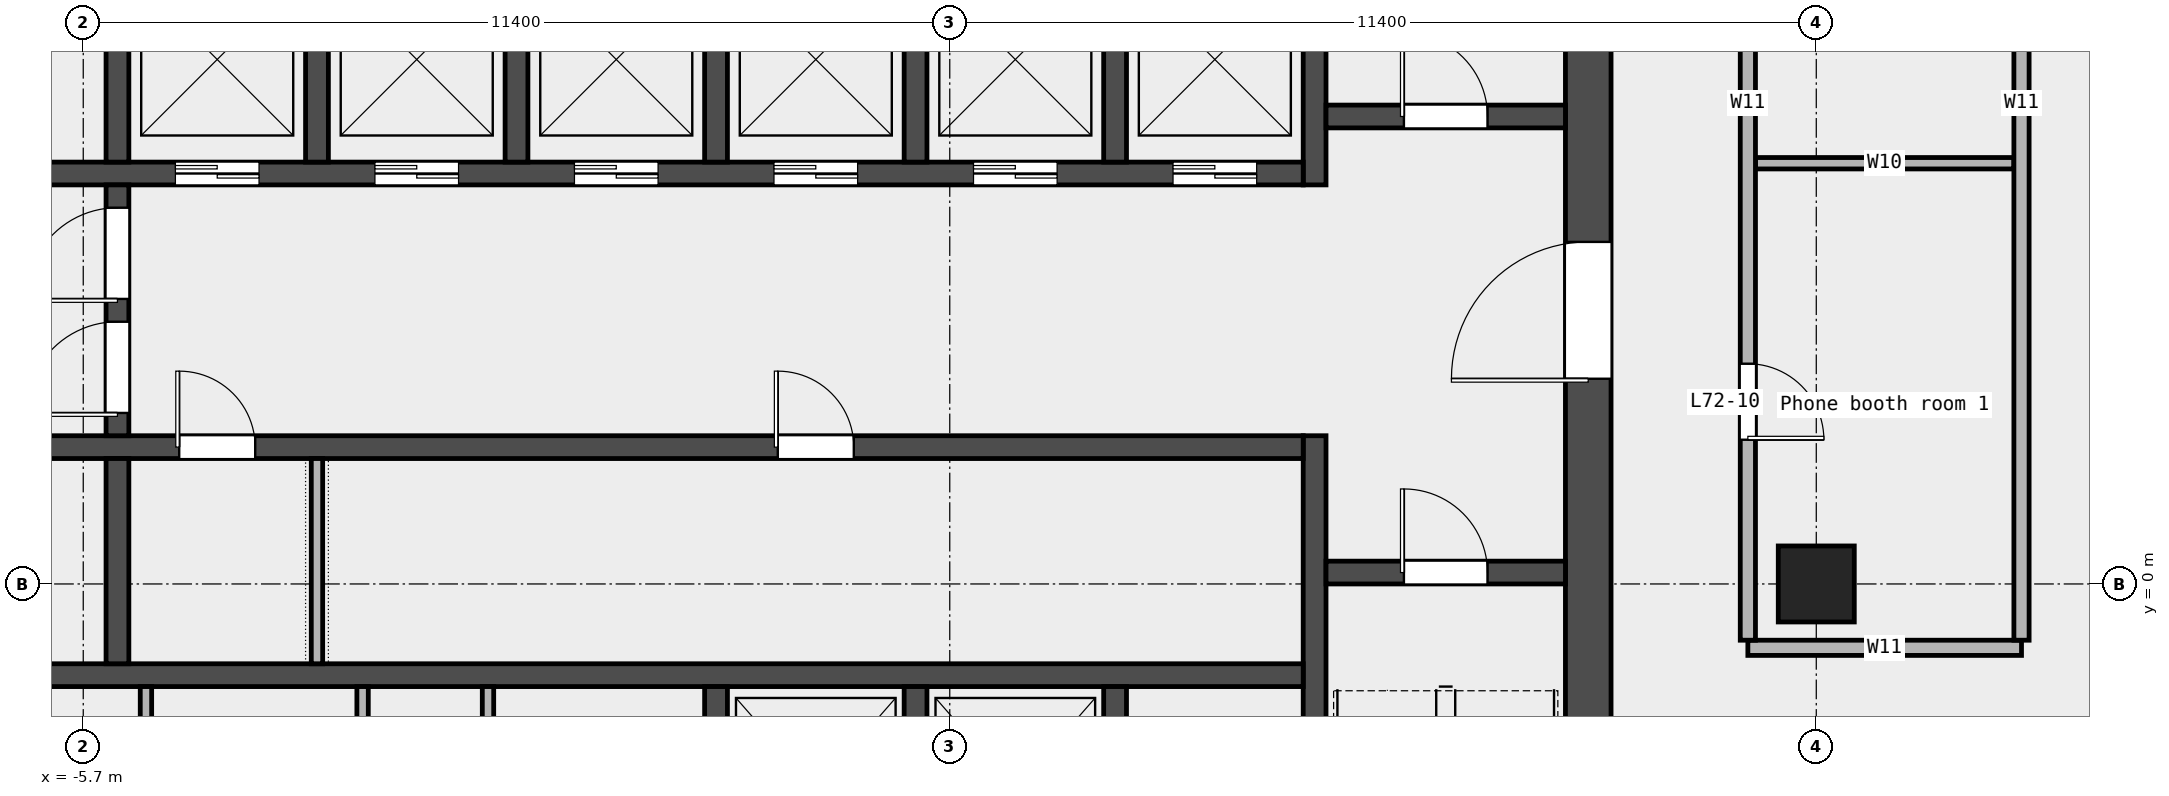
"""IFC4 building model, lengths in metres.
Left out: names, types, materials, properties, quantities, classifications, styles, units other than length and angle.
Written with IfcOpenShell. Run it as: python <this file> out.ifc"""

import sys

from ifc_helpers import new_model, si_unit, direction, frame, frame_2d, origin, origin_2d, place, context, subcontext, project, spatial, rectangle, extrude, element, fill, save


model = new_model("IFC4")
c1 = context("Model", 3, precision=1e-05, world=origin(), true_north=direction((0.0, 1.0)))
c2 = subcontext(c1, "Body", "Model", "MODEL_VIEW")
j1 = project(units=[si_unit("LENGTHUNIT", "METRE"), si_unit("PLANEANGLEUNIT", "RADIAN")], contexts=[c1])
p1 = place(None, origin())
s1 = spatial("IfcSite", under=j1, at=p1, CompositionType="ELEMENT")
p2 = place(p1, origin())
s2 = spatial("IfcBuilding", under=s1, at=p2, CompositionType="ELEMENT")
p3 = place(p2, frame((0.0, 0.0, 329.4)))
s3 = spatial("IfcBuildingStorey", under=s2, at=p3, CompositionType="ELEMENT", Elevation=329.4)
p4 = place(p3, frame((17.1, 0.0, 0.0), z_axis=(0.0, 0.0, 1.0), x_axis=(1.0, 0.0, 0.0)))
e1 = element("IfcColumn", 1, at=p4, inside=s3, PredefinedType="COLUMN", context=c2, shape_type="SweptSolid", body=[
    extrude(rectangle(XDim=1.0, YDim=1.0, at=origin_2d()), origin(), (0.0, 0.0, 1.0), 3.65),
])
p5 = place(p3, frame((16.2, -0.84, 0.0), z_axis=(0.0, 0.0, 1.0), x_axis=(1.0, 0.0, 0.0)))
e2 = element("IfcWall", 2, at=p5, inside=s3, PredefinedType="PARTITIONING", context=c2, shape_type="SweptSolid", body=[
    extrude(rectangle(XDim=3.6, YDim=0.2, at=frame_2d((1.8, 0.0))), origin(), (0.0, 0.0, 1.0), 3.65),
])
p6 = place(p3, frame((16.3, 5.535, 0.0), z_axis=(0.0, 0.0, 1.0), x_axis=(1.0, 0.0, 0.0)))
e3 = element("IfcWall", 3, at=p6, inside=s3, PredefinedType="PARTITIONING", context=c2, shape_type="SweptSolid", body=[
    extrude(rectangle(XDim=3.4, YDim=0.15, at=frame_2d((1.7, 0.0))), origin(), (0.0, 0.0, 1.0), 3.65),
])
p7 = place(p3, frame((16.2, -0.74, 0.0), z_axis=(0.0, 0.0, 1.0), x_axis=(0.0, 1.0, 0.0)))
e4 = element("IfcWall", 4, at=p7, inside=s3, PredefinedType="PARTITIONING", context=c2, shape_type="SweptSolid", body=[
    extrude(rectangle(XDim=14.14, YDim=0.2, at=frame_2d((7.07, 0.0))), origin(), (0.0, 0.0, 1.0), 3.65),
])
p8 = place(p7, frame((9.758, 0.0, 0.0)))
e5 = element("IfcOpeningElement", 5, at=p8, cuts=e4, PredefinedType="OPENING", context=c2, shape_type="SweptSolid", body=[
    extrude(rectangle(XDim=0.9, YDim=2.1, at=frame_2d((0.45, 1.05))), frame((0.0, 0.112, 0.0), z_axis=(0.0, -1.0, 0.0), x_axis=(1.0, 0.0, 0.0)), (0.0, 0.0, 1.0), 0.224),
])
p9 = place(p7, frame((2.637, 0.0, 0.0)))
e6 = element("IfcOpeningElement", 6, at=p9, cuts=e4, PredefinedType="OPENING", context=c2, shape_type="SweptSolid", body=[
    extrude(rectangle(XDim=1.0, YDim=2.1, at=frame_2d((0.5, 1.05))), frame((0.0, 0.112, 0.0), z_axis=(0.0, -1.0, 0.0), x_axis=(1.0, 0.0, 0.0)), (0.0, 0.0, 1.0), 0.224),
])
p10 = place(p3, frame((19.8, -0.74, 0.0), z_axis=(0.0, 0.0, 1.0), x_axis=(0.0, 1.0, 0.0)))
e7 = element("IfcWall", 7, at=p10, inside=s3, PredefinedType="PARTITIONING", context=c2, shape_type="SweptSolid", body=[
    extrude(rectangle(XDim=14.14, YDim=0.2, at=frame_2d((7.07, 0.0))), origin(), (0.0, 0.0, 1.0), 3.65),
])
p11 = place(p3, frame((14.1, -6.6, 0.0), z_axis=(0.0, 0.0, 1.0), x_axis=(0.0, 1.0, 0.0)))
e8 = element("IfcWall", 8, at=p11, inside=s3, PredefinedType="SHEAR", context=c2, shape_type="SweptSolid", body=[
    extrude(rectangle(XDim=19.5, YDim=0.6, at=frame_2d((9.75, 0.0))), origin(), (0.0, 0.0, 1.0), 3.7),
])
p12 = place(p11, frame((9.3, 0.0, 0.0)))
e9 = element("IfcOpeningElement", 9, at=p12, cuts=e8, PredefinedType="OPENING", context=c2, shape_type="SweptSolid", body=[
    extrude(rectangle(XDim=1.8, YDim=2.1, at=frame_2d((0.9, 1.05))), frame((0.0, 0.312, 0.0), z_axis=(0.0, -1.0, 0.0), x_axis=(1.0, 0.0, 0.0)), (0.0, 0.0, 1.0), 0.624),
])
p13 = place(p3, frame((10.5, -6.6, 0.0), z_axis=(0.0, 0.0, 1.0), x_axis=(0.0, 1.0, 0.0)))
e10 = element("IfcWall", 10, at=p13, inside=s3, PredefinedType="SHEAR", context=c2, shape_type="SweptSolid", body=[
    extrude(rectangle(XDim=8.55, YDim=0.3, at=frame_2d((4.275, 0.0))), origin(), (0.0, 0.0, 1.0), 3.7),
])
p14 = place(p3, frame((10.5, 5.25, 0.0), z_axis=(0.0, 0.0, 1.0), x_axis=(0.0, 1.0, 0.0)))
e11 = element("IfcWall", 11, at=p14, inside=s3, PredefinedType="SHEAR", context=c2, shape_type="SweptSolid", body=[
    extrude(rectangle(XDim=7.65, YDim=0.3, at=frame_2d((3.825, 0.0))), origin(), (0.0, 0.0, 1.0), 3.7),
])
p15 = place(p3, frame((10.65, 0.15, 0.0), z_axis=(0.0, 0.0, 1.0), x_axis=(1.0, 0.0, 0.0)))
e12 = element("IfcWall", 12, at=p15, inside=s3, PredefinedType="SOLIDWALL", context=c2, shape_type="SweptSolid", body=[
    extrude(rectangle(XDim=3.15, YDim=0.3, at=frame_2d((1.575, 0.0))), origin(), (0.0, 0.0, 1.0), 3.7),
])
p16 = place(p15, frame((1.025, 0.0, 0.0)))
e13 = element("IfcOpeningElement", 13, at=p16, cuts=e12, PredefinedType="OPENING", context=c2, shape_type="SweptSolid", body=[
    extrude(rectangle(XDim=1.1, YDim=2.1, at=frame_2d((0.55, 1.05))), frame((0.0, 0.162, 0.0), z_axis=(0.0, -1.0, 0.0), x_axis=(1.0, 0.0, 0.0)), (0.0, 0.0, 1.0), 0.324),
])
p17 = place(p3, frame((10.65, 6.15, 0.0), z_axis=(0.0, 0.0, 1.0), x_axis=(1.0, 0.0, 0.0)))
e14 = element("IfcWall", 14, at=p17, inside=s3, PredefinedType="SOLIDWALL", context=c2, shape_type="SweptSolid", body=[
    extrude(rectangle(XDim=3.15, YDim=0.3, at=frame_2d((1.575, 0.0))), origin(), (0.0, 0.0, 1.0), 3.7),
])
p18 = place(p17, frame((1.025, 0.0, 0.0)))
e15 = element("IfcOpeningElement", 15, at=p18, cuts=e14, PredefinedType="OPENING", context=c2, shape_type="SweptSolid", body=[
    extrude(rectangle(XDim=1.1, YDim=2.1, at=frame_2d((0.55, 1.05))), frame((0.0, 0.162, 0.0), z_axis=(0.0, -1.0, 0.0), x_axis=(1.0, 0.0, 0.0)), (0.0, 0.0, 1.0), 0.324),
])
p19 = place(p3, frame((-10.35, -1.2, 0.0), z_axis=(0.0, 0.0, 1.0), x_axis=(1.0, 0.0, 0.0)))
e16 = element("IfcWall", 16, at=p19, inside=s3, PredefinedType="SOLIDWALL", context=c2, shape_type="SweptSolid", body=[
    extrude(rectangle(XDim=20.7, YDim=0.3, at=frame_2d((10.35, 0.0))), origin(), (0.0, 0.0, 1.0), 3.7),
])
p20 = place(p3, frame((-10.35, 1.8, 0.0), z_axis=(0.0, 0.0, 1.0), x_axis=(1.0, 0.0, 0.0)))
e17 = element("IfcWall", 17, at=p20, inside=s3, PredefinedType="SOLIDWALL", context=c2, shape_type="SweptSolid", body=[
    extrude(rectangle(XDim=20.7, YDim=0.3, at=frame_2d((10.35, 0.0))), origin(), (0.0, 0.0, 1.0), 3.7),
])
p21 = place(p20, frame((0.512, 0.0, 0.0)))
e18 = element("IfcOpeningElement", 18, at=p21, cuts=e17, PredefinedType="OPENING", context=c2, shape_type="SweptSolid", body=[
    extrude(rectangle(XDim=1.3, YDim=2.1, at=frame_2d((0.65, 1.05))), frame((0.0, 0.162, 0.0), z_axis=(0.0, -1.0, 0.0), x_axis=(1.0, 0.0, 0.0)), (0.0, 0.0, 1.0), 0.324),
])
p22 = place(p20, frame((5.913, 0.0, 0.0)))
e19 = element("IfcOpeningElement", 19, at=p22, cuts=e17, PredefinedType="OPENING", context=c2, shape_type="SweptSolid", body=[
    extrude(rectangle(XDim=1.0, YDim=2.1, at=frame_2d((0.5, 1.05))), frame((0.0, 0.162, 0.0), z_axis=(0.0, -1.0, 0.0), x_axis=(1.0, 0.0, 0.0)), (0.0, 0.0, 1.0), 0.324),
])
p23 = place(p20, frame((13.788, 0.0, 0.0)))
e20 = element("IfcOpeningElement", 20, at=p23, cuts=e17, PredefinedType="OPENING", context=c2, shape_type="SweptSolid", body=[
    extrude(rectangle(XDim=1.0, YDim=2.1, at=frame_2d((0.5, 1.05))), frame((0.0, 0.162, 0.0), z_axis=(0.0, -1.0, 0.0), x_axis=(1.0, 0.0, 0.0)), (0.0, 0.0, 1.0), 0.324),
])
p24 = place(p3, frame((-10.35, 5.4, 0.0), z_axis=(0.0, 0.0, 1.0), x_axis=(1.0, 0.0, 0.0)))
e21 = element("IfcWall", 21, at=p24, inside=s3, PredefinedType="SOLIDWALL", context=c2, shape_type="SweptSolid", body=[
    extrude(rectangle(XDim=20.7, YDim=0.3, at=frame_2d((10.35, 0.0))), origin(), (0.0, 0.0, 1.0), 3.7),
])
p25 = place(p24, frame((0.512, 0.0, 0.0)))
e22 = element("IfcOpeningElement", 22, at=p25, cuts=e21, PredefinedType="OPENING", context=c2, shape_type="SweptSolid", body=[
    extrude(rectangle(XDim=1.3, YDim=2.1, at=frame_2d((0.65, 1.05))), frame((0.0, 0.162, 0.0), z_axis=(0.0, -1.0, 0.0), x_axis=(1.0, 0.0, 0.0)), (0.0, 0.0, 1.0), 0.324),
])
p26 = place(p24, frame((5.863, 0.0, 0.0)))
e23 = element("IfcOpeningElement", 23, at=p26, cuts=e21, PredefinedType="OPENING", context=c2, shape_type="SweptSolid", body=[
    extrude(rectangle(XDim=1.1, YDim=2.1, at=frame_2d((0.55, 1.05))), frame((0.0, 0.162, 0.0), z_axis=(0.0, -1.0, 0.0), x_axis=(1.0, 0.0, 0.0)), (0.0, 0.0, 1.0), 0.324),
])
p27 = place(p24, frame((8.488, 0.0, 0.0)))
e24 = element("IfcOpeningElement", 24, at=p27, cuts=e21, PredefinedType="OPENING", context=c2, shape_type="SweptSolid", body=[
    extrude(rectangle(XDim=1.1, YDim=2.1, at=frame_2d((0.55, 1.05))), frame((0.0, 0.162, 0.0), z_axis=(0.0, -1.0, 0.0), x_axis=(1.0, 0.0, 0.0)), (0.0, 0.0, 1.0), 0.324),
])
p28 = place(p24, frame((11.113, 0.0, 0.0)))
e25 = element("IfcOpeningElement", 25, at=p28, cuts=e21, PredefinedType="OPENING", context=c2, shape_type="SweptSolid", body=[
    extrude(rectangle(XDim=1.1, YDim=2.1, at=frame_2d((0.55, 1.05))), frame((0.0, 0.162, 0.0), z_axis=(0.0, -1.0, 0.0), x_axis=(1.0, 0.0, 0.0)), (0.0, 0.0, 1.0), 0.324),
])
p29 = place(p24, frame((13.738, 0.0, 0.0)))
e26 = element("IfcOpeningElement", 26, at=p29, cuts=e21, PredefinedType="OPENING", context=c2, shape_type="SweptSolid", body=[
    extrude(rectangle(XDim=1.1, YDim=2.1, at=frame_2d((0.55, 1.05))), frame((0.0, 0.162, 0.0), z_axis=(0.0, -1.0, 0.0), x_axis=(1.0, 0.0, 0.0)), (0.0, 0.0, 1.0), 0.324),
])
p30 = place(p24, frame((16.363, 0.0, 0.0)))
e27 = element("IfcOpeningElement", 27, at=p30, cuts=e21, PredefinedType="OPENING", context=c2, shape_type="SweptSolid", body=[
    extrude(rectangle(XDim=1.1, YDim=2.1, at=frame_2d((0.55, 1.05))), frame((0.0, 0.162, 0.0), z_axis=(0.0, -1.0, 0.0), x_axis=(1.0, 0.0, 0.0)), (0.0, 0.0, 1.0), 0.324),
])
p31 = place(p24, frame((18.988, 0.0, 0.0)))
e28 = element("IfcOpeningElement", 28, at=p31, cuts=e21, PredefinedType="OPENING", context=c2, shape_type="SweptSolid", body=[
    extrude(rectangle(XDim=1.1, YDim=2.1, at=frame_2d((0.55, 1.05))), frame((0.0, 0.162, 0.0), z_axis=(0.0, -1.0, 0.0), x_axis=(1.0, 0.0, 0.0)), (0.0, 0.0, 1.0), 0.324),
])
for number, where, z_axis, x_axis in (
    (29, (-5.25, -1.05, 0.0), (0.0, 0.0, 1.0), (0.0, 1.0, 0.0)),
    (30, (-5.25, 5.55, 0.0), (0.0, 0.0, 1.0), (0.0, 1.0, 0.0)),
    (31, (-2.625, 5.55, 0.0), (0.0, 0.0, 1.0), (0.0, 1.0, 0.0)),
    (32, (0.0, 5.55, 0.0), (0.0, 0.0, 1.0), (0.0, 1.0, 0.0)),
    (33, (2.625, 5.55, 0.0), (0.0, 0.0, 1.0), (0.0, 1.0, 0.0)),
    (34, (5.25, 5.55, 0.0), (0.0, 0.0, 1.0), (0.0, 1.0, 0.0)),
    (35, (7.875, 5.55, 0.0), (0.0, 0.0, 1.0), (0.0, 1.0, 0.0)),
):
    element("IfcWall", number, at=place(p3, frame(where, z_axis=z_axis, x_axis=x_axis)), inside=s3, PredefinedType="SOLIDWALL", context=c2, shape_type="SweptSolid", body=[
        extrude(rectangle(XDim=2.7, YDim=0.3, at=frame_2d((1.35, 0.0))), origin(), (0.0, 0.0, 1.0), 3.7),
    ])
p32 = place(p3, frame((-5.25, 1.95, 0.0), z_axis=(0.0, 0.0, 1.0), x_axis=(0.0, 1.0, 0.0)))
e36 = element("IfcWall", 36, at=p32, inside=s3, PredefinedType="SOLIDWALL", context=c2, shape_type="SweptSolid", body=[
    extrude(rectangle(XDim=3.3, YDim=0.3, at=frame_2d((1.65, 0.0))), origin(), (0.0, 0.0, 1.0), 3.7),
])
p33 = place(p32, frame((0.3, 0.0, 0.0)))
e37 = element("IfcOpeningElement", 37, at=p33, cuts=e36, PredefinedType="OPENING", context=c2, shape_type="SweptSolid", body=[
    extrude(rectangle(XDim=1.2, YDim=2.1, at=frame_2d((0.6, 1.05))), frame((0.0, 0.162, 0.0), z_axis=(0.0, -1.0, 0.0), x_axis=(1.0, 0.0, 0.0)), (0.0, 0.0, 1.0), 0.324),
])
p34 = place(p32, frame((1.8, 0.0, 0.0)))
e38 = element("IfcOpeningElement", 38, at=p34, cuts=e36, PredefinedType="OPENING", context=c2, shape_type="SweptSolid", body=[
    extrude(rectangle(XDim=1.2, YDim=2.1, at=frame_2d((0.6, 1.05))), frame((0.0, 0.162, 0.0), z_axis=(0.0, -1.0, 0.0), x_axis=(1.0, 0.0, 0.0)), (0.0, 0.0, 1.0), 0.324),
])
for number, where, z_axis, x_axis in (
    (39, (2.625, -4.05, 0.0), (0.0, 0.0, 1.0), (0.0, 1.0, 0.0)),
    (40, (5.25, -4.05, 0.0), (0.0, 0.0, 1.0), (0.0, 1.0, 0.0)),
    (41, (7.875, -4.05, 0.0), (0.0, 0.0, 1.0), (0.0, 1.0, 0.0)),
):
    element("IfcWall", number, at=place(p3, frame(where, z_axis=z_axis, x_axis=x_axis)), inside=s3, PredefinedType="SOLIDWALL", context=c2, shape_type="SweptSolid", body=[
        extrude(rectangle(XDim=2.7, YDim=0.3, at=frame_2d((1.35, 0.0))), origin(), (0.0, 0.0, 1.0), 3.7),
    ])
for number, where, z_axis, x_axis in (
    (42, (-4.875, -4.425, 0.0), (0.0, 0.0, 1.0), (0.0, 1.0, 0.0)),
    (43, (-2.025, -4.425, 0.0), (0.0, 0.0, 1.0), (0.0, 1.0, 0.0)),
):
    element("IfcWall", number, at=place(p3, frame(where, z_axis=z_axis, x_axis=x_axis)), inside=s3, PredefinedType="PARTITIONING", context=c2, shape_type="SweptSolid", body=[
        extrude(rectangle(XDim=3.075, YDim=0.15, at=frame_2d((1.538, 0.0))), origin(), (0.0, 0.0, 1.0), 3.7),
    ])
p35 = place(p3, frame((-0.375, -6.6, 0.0), z_axis=(0.0, 0.0, 1.0), x_axis=(0.0, 1.0, 0.0)))
e44 = element("IfcWall", 44, at=p35, inside=s3, PredefinedType="PARTITIONING", context=c2, shape_type="SweptSolid", body=[
    extrude(rectangle(XDim=5.25, YDim=0.15, at=frame_2d((2.625, 0.0))), origin(), (0.0, 0.0, 1.0), 3.7),
])
p36 = place(p3, frame((-2.625, -1.05, 0.0), z_axis=(0.0, 0.0, 1.0), x_axis=(0.0, 1.0, 0.0)))
e45 = element("IfcWall", 45, at=p36, inside=s3, PredefinedType="PARTITIONING", context=c2, shape_type="SweptSolid", body=[
    extrude(rectangle(XDim=2.7, YDim=0.15, at=frame_2d((1.35, 0.0))), origin(), (0.0, 0.0, 1.0), 3.7),
])
p37 = place(p9, origin())
e46 = element("IfcDoor", 46, at=p37, inside=s3, OperationType="SINGLE_SWING_RIGHT", PredefinedType="DOOR", context=c2, shape_type="SweptSolid", body=[
    extrude(rectangle(XDim=1.0, YDim=2.1, at=frame_2d((0.5, 1.05))), frame((0.0, 0.025, 0.0), z_axis=(0.0, -1.0, 0.0), x_axis=(1.0, 0.0, 0.0)), (0.0, 0.0, 1.0), 0.05),
])
fill(e6, e46)
p38 = place(p16, origin())
e47 = element("IfcDoor", 47, at=p38, inside=s3, OperationType="SINGLE_SWING_RIGHT", PredefinedType="DOOR", context=c2, shape_type="SweptSolid", body=[
    extrude(rectangle(XDim=1.1, YDim=2.1, at=frame_2d((0.55, 1.05))), frame((0.0, 0.025, 0.0), z_axis=(0.0, -1.0, 0.0), x_axis=(1.0, 0.0, 0.0)), (0.0, 0.0, 1.0), 0.05),
])
fill(e13, e47)
p39 = place(p18, origin())
e48 = element("IfcDoor", 48, at=p39, inside=s3, OperationType="SINGLE_SWING_RIGHT", PredefinedType="DOOR", context=c2, shape_type="SweptSolid", body=[
    extrude(rectangle(XDim=1.1, YDim=2.1, at=frame_2d((0.55, 1.05))), frame((0.0, 0.025, 0.0), z_axis=(0.0, -1.0, 0.0), x_axis=(1.0, 0.0, 0.0)), (0.0, 0.0, 1.0), 0.05),
])
fill(e15, e48)
p40 = place(p12, origin())
e49 = element("IfcDoor", 49, at=p40, inside=s3, OperationType="DOUBLE_DOOR_SINGLE_SWING", PredefinedType="DOOR", context=c2, shape_type="SweptSolid", body=[
    extrude(rectangle(XDim=1.8, YDim=2.1, at=frame_2d((0.9, 1.05))), frame((0.0, 0.025, 0.0), z_axis=(0.0, -1.0, 0.0), x_axis=(1.0, 0.0, 0.0)), (0.0, 0.0, 1.0), 0.05),
])
fill(e9, e49)
p41 = place(p33, origin())
e50 = element("IfcDoor", 50, at=p41, inside=s3, OperationType="SINGLE_SWING_LEFT", PredefinedType="DOOR", context=c2, shape_type="SweptSolid", body=[
    extrude(rectangle(XDim=1.2, YDim=2.1, at=frame_2d((0.6, 1.05))), frame((0.0, 0.025, 0.0), z_axis=(0.0, -1.0, 0.0), x_axis=(1.0, 0.0, 0.0)), (0.0, 0.0, 1.0), 0.05),
])
fill(e37, e50)
p42 = place(p34, origin())
e51 = element("IfcDoor", 51, at=p42, inside=s3, OperationType="SINGLE_SWING_RIGHT", PredefinedType="DOOR", context=c2, shape_type="SweptSolid", body=[
    extrude(rectangle(XDim=1.2, YDim=2.1, at=frame_2d((0.6, 1.05))), frame((0.0, 0.025, 0.0), z_axis=(0.0, -1.0, 0.0), x_axis=(1.0, 0.0, 0.0)), (0.0, 0.0, 1.0), 0.05),
])
fill(e38, e51)
p43 = place(p26, origin())
e52 = element("IfcDoor", 52, at=p43, inside=s3, OperationType="DOUBLE_DOOR_SLIDING", PredefinedType="DOOR", context=c2, shape_type="SweptSolid", body=[
    extrude(rectangle(XDim=1.1, YDim=2.1, at=frame_2d((0.55, 1.05))), frame((0.0, 0.025, 0.0), z_axis=(0.0, -1.0, 0.0), x_axis=(1.0, 0.0, 0.0)), (0.0, 0.0, 1.0), 0.05),
])
fill(e23, e52)
p44 = place(p27, origin())
e53 = element("IfcDoor", 53, at=p44, inside=s3, OperationType="DOUBLE_DOOR_SLIDING", PredefinedType="DOOR", context=c2, shape_type="SweptSolid", body=[
    extrude(rectangle(XDim=1.1, YDim=2.1, at=frame_2d((0.55, 1.05))), frame((0.0, 0.025, 0.0), z_axis=(0.0, -1.0, 0.0), x_axis=(1.0, 0.0, 0.0)), (0.0, 0.0, 1.0), 0.05),
])
fill(e24, e53)
p45 = place(p28, origin())
e54 = element("IfcDoor", 54, at=p45, inside=s3, OperationType="DOUBLE_DOOR_SLIDING", PredefinedType="DOOR", context=c2, shape_type="SweptSolid", body=[
    extrude(rectangle(XDim=1.1, YDim=2.1, at=frame_2d((0.55, 1.05))), frame((0.0, 0.025, 0.0), z_axis=(0.0, -1.0, 0.0), x_axis=(1.0, 0.0, 0.0)), (0.0, 0.0, 1.0), 0.05),
])
fill(e25, e54)
p46 = place(p29, origin())
e55 = element("IfcDoor", 55, at=p46, inside=s3, OperationType="DOUBLE_DOOR_SLIDING", PredefinedType="DOOR", context=c2, shape_type="SweptSolid", body=[
    extrude(rectangle(XDim=1.1, YDim=2.1, at=frame_2d((0.55, 1.05))), frame((0.0, 0.025, 0.0), z_axis=(0.0, -1.0, 0.0), x_axis=(1.0, 0.0, 0.0)), (0.0, 0.0, 1.0), 0.05),
])
fill(e26, e55)
p47 = place(p30, origin())
e56 = element("IfcDoor", 56, at=p47, inside=s3, OperationType="DOUBLE_DOOR_SLIDING", PredefinedType="DOOR", context=c2, shape_type="SweptSolid", body=[
    extrude(rectangle(XDim=1.1, YDim=2.1, at=frame_2d((0.55, 1.05))), frame((0.0, 0.025, 0.0), z_axis=(0.0, -1.0, 0.0), x_axis=(1.0, 0.0, 0.0)), (0.0, 0.0, 1.0), 0.05),
])
fill(e27, e56)
p48 = place(p31, origin())
e57 = element("IfcDoor", 57, at=p48, inside=s3, OperationType="DOUBLE_DOOR_SLIDING", PredefinedType="DOOR", context=c2, shape_type="SweptSolid", body=[
    extrude(rectangle(XDim=1.1, YDim=2.1, at=frame_2d((0.55, 1.05))), frame((0.0, 0.025, 0.0), z_axis=(0.0, -1.0, 0.0), x_axis=(1.0, 0.0, 0.0)), (0.0, 0.0, 1.0), 0.05),
])
fill(e28, e57)
p49 = place(p22, origin())
e58 = element("IfcDoor", 58, at=p49, inside=s3, OperationType="SINGLE_SWING_LEFT", PredefinedType="DOOR", context=c2, shape_type="SweptSolid", body=[
    extrude(rectangle(XDim=1.0, YDim=2.1, at=frame_2d((0.5, 1.05))), frame((0.0, 0.025, 0.0), z_axis=(0.0, -1.0, 0.0), x_axis=(1.0, 0.0, 0.0)), (0.0, 0.0, 1.0), 0.05),
])
fill(e19, e58)
p50 = place(p23, origin())
e59 = element("IfcDoor", 59, at=p50, inside=s3, OperationType="SINGLE_SWING_LEFT", PredefinedType="DOOR", context=c2, shape_type="SweptSolid", body=[
    extrude(rectangle(XDim=1.0, YDim=2.1, at=frame_2d((0.5, 1.05))), frame((0.0, 0.025, 0.0), z_axis=(0.0, -1.0, 0.0), x_axis=(1.0, 0.0, 0.0)), (0.0, 0.0, 1.0), 0.05),
])
fill(e20, e59)
save(model, sys.argv[1])
